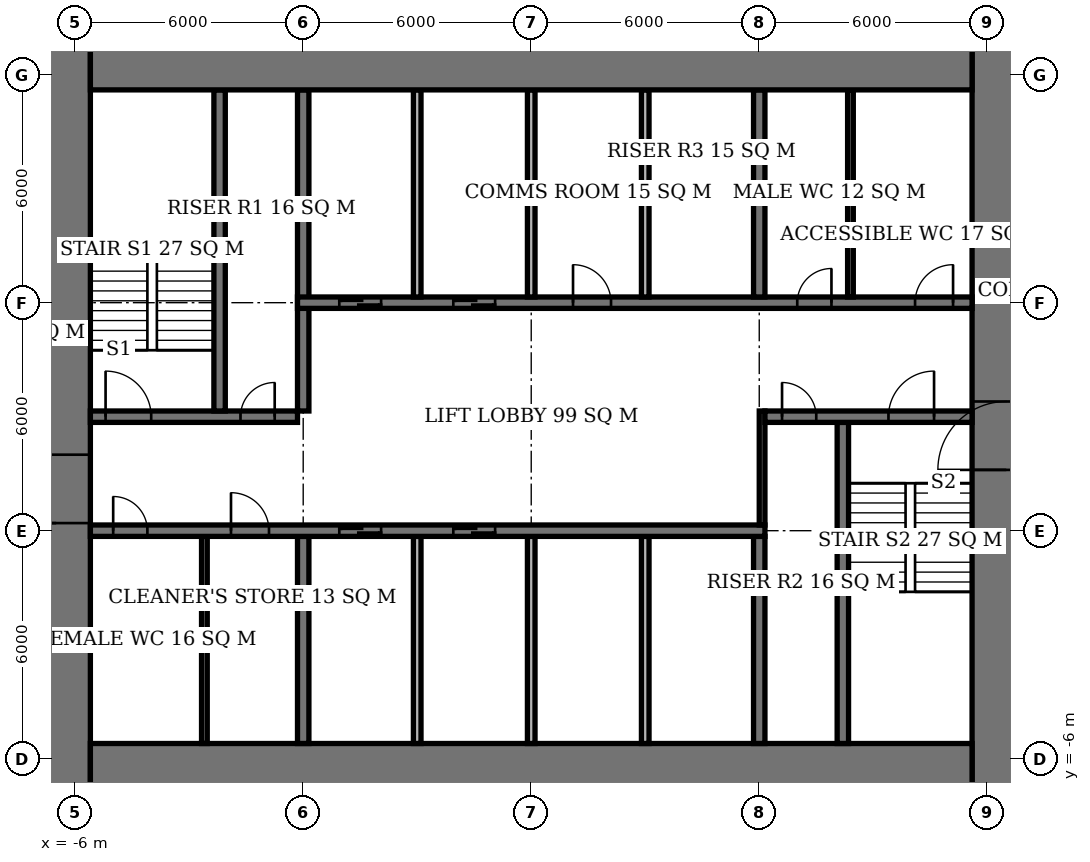
"""IFC4 building model, lengths in metres.
Left out: names, types, materials, properties, quantities, classifications, styles, units other than length and angle.
Written with IfcOpenShell. Run it as: python <this file> out.ifc"""

import sys

from ifc_helpers import new_model, si_unit, direction, frame, frame_2d, origin, place, context, subcontext, project, spatial, rectangle, extrude, element, fill, save


model = new_model("IFC4")
c1 = context("Model", 3, precision=1e-05, world=origin(), true_north=direction((0.0, 1.0)))
c2 = subcontext(c1, "Body", "Model", "MODEL_VIEW")
j1 = project(units=[si_unit("LENGTHUNIT", "METRE"), si_unit("PLANEANGLEUNIT", "RADIAN")], contexts=[c1])
p1 = place(None, origin())
s1 = spatial("IfcSite", under=j1, at=p1, CompositionType="ELEMENT")
p2 = place(p1, origin())
s2 = spatial("IfcBuilding", under=s1, at=p2, CompositionType="ELEMENT")
p3 = place(p2, frame((0.0, 0.0, 117.2)))
s3 = spatial("IfcBuildingStorey", under=s2, at=p3, CompositionType="ELEMENT", Elevation=117.2)
for number, where, z_axis, x_axis in (
    (1, (-5.6, -6.6, 0.0), (0.0, 0.0, 1.0), (1.0, 0.0, 0.0)),
    (2, (-5.6, 12.6, 0.0), (0.0, 0.0, 1.0), (1.0, 0.0, 0.0)),
):
    element("IfcWall", number, at=place(p3, frame(where, z_axis=z_axis, x_axis=x_axis)), inside=s3, PredefinedType="SHEAR", context=c2, shape_type="SweptSolid", body=[
        extrude(rectangle(XDim=23.2, YDim=2.0, at=frame_2d((11.6, 0.0))), origin(), (0.0, 0.0, 1.0), 3.9),
    ])
p4 = place(p3, frame((-6.5, -7.6, 0.0), z_axis=(0.0, 0.0, 1.0), x_axis=(0.0, 1.0, 0.0)))
e3 = element("IfcWall", 3, at=p4, inside=s3, PredefinedType="SHEAR", context=c2, shape_type="SweptSolid", body=[
    extrude(rectangle(XDim=21.2, YDim=1.8, at=frame_2d((10.6, 0.0))), origin(), (0.0, 0.0, 1.0), 3.9),
])
p5 = place(p4, frame((7.8, 0.0, 0.0)))
e4 = element("IfcOpeningElement", 4, at=p5, cuts=e3, PredefinedType="OPENING", context=c2, shape_type="SweptSolid", body=[
    extrude(rectangle(XDim=1.8, YDim=2.4, at=frame_2d((0.9, 1.2))), frame((0.0, 0.91, 0.0), z_axis=(0.0, -1.0, 0.0), x_axis=(1.0, 0.0, 0.0)), (0.0, 0.0, 1.0), 1.82),
])
p6 = place(p3, frame((18.5, -7.6, 0.0), z_axis=(0.0, 0.0, 1.0), x_axis=(0.0, 1.0, 0.0)))
e5 = element("IfcWall", 5, at=p6, inside=s3, PredefinedType="SHEAR", context=c2, shape_type="SweptSolid", body=[
    extrude(rectangle(XDim=21.2, YDim=1.8, at=frame_2d((10.6, 0.0))), origin(), (0.0, 0.0, 1.0), 3.9),
])
p7 = place(p6, frame((9.2, 0.0, 0.0)))
e6 = element("IfcOpeningElement", 6, at=p7, cuts=e5, PredefinedType="OPENING", context=c2, shape_type="SweptSolid", body=[
    extrude(rectangle(XDim=1.8, YDim=2.4, at=frame_2d((0.9, 1.2))), frame((0.0, 0.91, 0.0), z_axis=(0.0, -1.0, 0.0), x_axis=(1.0, 0.0, 0.0)), (0.0, 0.0, 1.0), 1.82),
])
p8 = place(p3, frame((-5.6, 0.0, 0.0), z_axis=(0.0, 0.0, 1.0), x_axis=(1.0, 0.0, 0.0)))
e7 = element("IfcWall", 7, at=p8, inside=s3, PredefinedType="SHEAR", context=c2, shape_type="SweptSolid", body=[
    extrude(rectangle(XDim=17.75, YDim=0.3, at=frame_2d((8.875, 0.0))), origin(), (0.0, 0.0, 1.0), 3.9),
])
p9 = place(p8, frame((0.6, 0.0, 0.0)))
e8 = element("IfcOpeningElement", 8, at=p9, cuts=e7, PredefinedType="OPENING", context=c2, shape_type="SweptSolid", body=[
    extrude(rectangle(XDim=0.9, YDim=2.1, at=frame_2d((0.45, 1.05))), frame((0.0, 0.16, 0.0), z_axis=(0.0, -1.0, 0.0), x_axis=(1.0, 0.0, 0.0)), (0.0, 0.0, 1.0), 0.32),
])
p10 = place(p8, frame((3.7, 0.0, 0.0)))
e9 = element("IfcOpeningElement", 9, at=p10, cuts=e7, PredefinedType="OPENING", context=c2, shape_type="SweptSolid", body=[
    extrude(rectangle(XDim=1.0, YDim=2.1, at=frame_2d((0.5, 1.05))), frame((0.0, 0.16, 0.0), z_axis=(0.0, -1.0, 0.0), x_axis=(1.0, 0.0, 0.0)), (0.0, 0.0, 1.0), 0.32),
])
p11 = place(p8, frame((6.55, 0.0, 0.0)))
e10 = element("IfcOpeningElement", 10, at=p11, cuts=e7, PredefinedType="OPENING", context=c2, shape_type="SweptSolid", body=[
    extrude(rectangle(XDim=1.1, YDim=2.1, at=frame_2d((0.55, 1.05))), frame((0.0, 0.16, 0.0), z_axis=(0.0, -1.0, 0.0), x_axis=(1.0, 0.0, 0.0)), (0.0, 0.0, 1.0), 0.32),
])
p12 = place(p8, frame((9.55, 0.0, 0.0)))
e11 = element("IfcOpeningElement", 11, at=p12, cuts=e7, PredefinedType="OPENING", context=c2, shape_type="SweptSolid", body=[
    extrude(rectangle(XDim=1.1, YDim=2.1, at=frame_2d((0.55, 1.05))), frame((0.0, 0.16, 0.0), z_axis=(0.0, -1.0, 0.0), x_axis=(1.0, 0.0, 0.0)), (0.0, 0.0, 1.0), 0.32),
])
p13 = place(p3, frame((-5.6, 3.0, 0.0), z_axis=(0.0, 0.0, 1.0), x_axis=(1.0, 0.0, 0.0)))
e12 = element("IfcWall", 12, at=p13, inside=s3, PredefinedType="SHEAR", context=c2, shape_type="SweptSolid", body=[
    extrude(rectangle(XDim=5.45, YDim=0.3, at=frame_2d((2.725, 0.0))), origin(), (0.0, 0.0, 1.0), 3.9),
])
p14 = place(p13, frame((0.4, 0.0, 0.0)))
e13 = element("IfcOpeningElement", 13, at=p14, cuts=e12, PredefinedType="OPENING", context=c2, shape_type="SweptSolid", body=[
    extrude(rectangle(XDim=1.2, YDim=2.1, at=frame_2d((0.6, 1.05))), frame((0.0, 0.16, 0.0), z_axis=(0.0, -1.0, 0.0), x_axis=(1.0, 0.0, 0.0)), (0.0, 0.0, 1.0), 0.32),
])
p15 = place(p13, frame((3.95, 0.0, 0.0)))
e14 = element("IfcOpeningElement", 14, at=p15, cuts=e12, PredefinedType="OPENING", context=c2, shape_type="SweptSolid", body=[
    extrude(rectangle(XDim=0.9, YDim=2.1, at=frame_2d((0.45, 1.05))), frame((0.0, 0.16, 0.0), z_axis=(0.0, -1.0, 0.0), x_axis=(1.0, 0.0, 0.0)), (0.0, 0.0, 1.0), 0.32),
])
p16 = place(p3, frame((12.15, 3.0, 0.0), z_axis=(0.0, 0.0, 1.0), x_axis=(1.0, 0.0, 0.0)))
e15 = element("IfcWall", 15, at=p16, inside=s3, PredefinedType="SHEAR", context=c2, shape_type="SweptSolid", body=[
    extrude(rectangle(XDim=5.45, YDim=0.3, at=frame_2d((2.725, 0.0))), origin(), (0.0, 0.0, 1.0), 3.9),
])
p17 = place(p16, frame((3.25, 0.0, 0.0)))
e16 = element("IfcOpeningElement", 16, at=p17, cuts=e15, PredefinedType="OPENING", context=c2, shape_type="SweptSolid", body=[
    extrude(rectangle(XDim=1.2, YDim=2.1, at=frame_2d((0.6, 1.05))), frame((0.0, 0.16, 0.0), z_axis=(0.0, -1.0, 0.0), x_axis=(1.0, 0.0, 0.0)), (0.0, 0.0, 1.0), 0.32),
])
p18 = place(p16, frame((0.45, 0.0, 0.0)))
e17 = element("IfcOpeningElement", 17, at=p18, cuts=e15, PredefinedType="OPENING", context=c2, shape_type="SweptSolid", body=[
    extrude(rectangle(XDim=0.9, YDim=2.1, at=frame_2d((0.45, 1.05))), frame((0.0, 0.16, 0.0), z_axis=(0.0, -1.0, 0.0), x_axis=(1.0, 0.0, 0.0)), (0.0, 0.0, 1.0), 0.32),
])
p19 = place(p3, frame((-0.15, 6.0, 0.0), z_axis=(0.0, 0.0, 1.0), x_axis=(1.0, 0.0, 0.0)))
e18 = element("IfcWall", 18, at=p19, inside=s3, PredefinedType="SHEAR", context=c2, shape_type="SweptSolid", body=[
    extrude(rectangle(XDim=17.75, YDim=0.3, at=frame_2d((8.875, 0.0))), origin(), (0.0, 0.0, 1.0), 3.9),
])
p20 = place(p19, frame((13.15, 0.0, 0.0)))
e19 = element("IfcOpeningElement", 19, at=p20, cuts=e18, PredefinedType="OPENING", context=c2, shape_type="SweptSolid", body=[
    extrude(rectangle(XDim=0.9, YDim=2.1, at=frame_2d((0.45, 1.05))), frame((0.0, 0.16, 0.0), z_axis=(0.0, -1.0, 0.0), x_axis=(1.0, 0.0, 0.0)), (0.0, 0.0, 1.0), 0.32),
])
p21 = place(p19, frame((16.25, 0.0, 0.0)))
e20 = element("IfcOpeningElement", 20, at=p21, cuts=e18, PredefinedType="OPENING", context=c2, shape_type="SweptSolid", body=[
    extrude(rectangle(XDim=1.0, YDim=2.1, at=frame_2d((0.5, 1.05))), frame((0.0, 0.16, 0.0), z_axis=(0.0, -1.0, 0.0), x_axis=(1.0, 0.0, 0.0)), (0.0, 0.0, 1.0), 0.32),
])
p22 = place(p19, frame((7.25, 0.0, 0.0)))
e21 = element("IfcOpeningElement", 21, at=p22, cuts=e18, PredefinedType="OPENING", context=c2, shape_type="SweptSolid", body=[
    extrude(rectangle(XDim=1.0, YDim=2.1, at=frame_2d((0.5, 1.05))), frame((0.0, 0.16, 0.0), z_axis=(0.0, -1.0, 0.0), x_axis=(1.0, 0.0, 0.0)), (0.0, 0.0, 1.0), 0.32),
])
p23 = place(p19, frame((1.1, 0.0, 0.0)))
e22 = element("IfcOpeningElement", 22, at=p23, cuts=e18, PredefinedType="OPENING", context=c2, shape_type="SweptSolid", body=[
    extrude(rectangle(XDim=1.1, YDim=2.1, at=frame_2d((0.55, 1.05))), frame((0.0, 0.16, 0.0), z_axis=(0.0, -1.0, 0.0), x_axis=(1.0, 0.0, 0.0)), (0.0, 0.0, 1.0), 0.32),
])
p24 = place(p19, frame((4.1, 0.0, 0.0)))
e23 = element("IfcOpeningElement", 23, at=p24, cuts=e18, PredefinedType="OPENING", context=c2, shape_type="SweptSolid", body=[
    extrude(rectangle(XDim=1.1, YDim=2.1, at=frame_2d((0.55, 1.05))), frame((0.0, 0.16, 0.0), z_axis=(0.0, -1.0, 0.0), x_axis=(1.0, 0.0, 0.0)), (0.0, 0.0, 1.0), 0.32),
])
p25 = place(p3, frame((0.0, -5.6, 0.0), z_axis=(0.0, 0.0, 1.0), x_axis=(0.0, 1.0, 0.0)))
e24 = element("IfcWall", 24, at=p25, inside=s3, PredefinedType="SHEAR", context=c2, shape_type="SweptSolid", body=[
    extrude(rectangle(XDim=5.45, YDim=0.3, at=frame_2d((2.725, 0.0))), origin(), (0.0, 0.0, 1.0), 3.9),
])
p26 = place(p3, frame((0.0, 3.15, 0.0), z_axis=(0.0, 0.0, 1.0), x_axis=(0.0, 1.0, 0.0)))
e25 = element("IfcWall", 25, at=p26, inside=s3, PredefinedType="SHEAR", context=c2, shape_type="SweptSolid", body=[
    extrude(rectangle(XDim=8.45, YDim=0.3, at=frame_2d((4.225, 0.0))), origin(), (0.0, 0.0, 1.0), 3.9),
])
for number, where, z_axis, x_axis in (
    (26, (12.0, -5.6, 0.0), (0.0, 0.0, 1.0), (0.0, 1.0, 0.0)),
    (27, (12.0, 6.15, 0.0), (0.0, 0.0, 1.0), (0.0, 1.0, 0.0)),
):
    element("IfcWall", number, at=place(p3, frame(where, z_axis=z_axis, x_axis=x_axis)), inside=s3, PredefinedType="SHEAR", context=c2, shape_type="SweptSolid", body=[
        extrude(rectangle(XDim=5.45, YDim=0.3, at=frame_2d((2.725, 0.0))), origin(), (0.0, 0.0, 1.0), 3.9),
    ])
for number, where, z_axis, x_axis in (
    (28, (-2.2, 3.15, 0.0), (0.0, 0.0, 1.0), (0.0, 1.0, 0.0)),
    (29, (14.2, -5.6, 0.0), (0.0, 0.0, 1.0), (0.0, 1.0, 0.0)),
):
    element("IfcWall", number, at=place(p3, frame(where, z_axis=z_axis, x_axis=x_axis)), inside=s3, PredefinedType="SHEAR", context=c2, shape_type="SweptSolid", body=[
        extrude(rectangle(XDim=8.45, YDim=0.3, at=frame_2d((4.225, 0.0))), origin(), (0.0, 0.0, 1.0), 3.9),
    ])
for number, where, z_axis, x_axis in (
    (30, (3.0, 6.15, 0.0), (0.0, 0.0, 1.0), (0.0, 1.0, 0.0)),
    (31, (6.0, 6.15, 0.0), (0.0, 0.0, 1.0), (0.0, 1.0, 0.0)),
    (32, (9.0, 6.15, 0.0), (0.0, 0.0, 1.0), (0.0, 1.0, 0.0)),
    (33, (3.0, -5.6, 0.0), (0.0, 0.0, 1.0), (0.0, 1.0, 0.0)),
    (34, (6.0, -5.6, 0.0), (0.0, 0.0, 1.0), (0.0, 1.0, 0.0)),
    (35, (9.0, -5.6, 0.0), (0.0, 0.0, 1.0), (0.0, 1.0, 0.0)),
):
    element("IfcWall", number, at=place(p3, frame(where, z_axis=z_axis, x_axis=x_axis)), inside=s3, PredefinedType="SOLIDWALL", context=c2, shape_type="SweptSolid", body=[
        extrude(rectangle(XDim=5.45, YDim=0.2, at=frame_2d((2.725, 0.0))), origin(), (0.0, 0.0, 1.0), 3.9),
    ])
for number, where, z_axis, x_axis in (
    (36, (-2.6, -5.6, 0.0), (0.0, 0.0, 1.0), (0.0, 1.0, 0.0)),
    (37, (14.4, 6.15, 0.0), (0.0, 0.0, 1.0), (0.0, 1.0, 0.0)),
):
    element("IfcWall", number, at=place(p3, frame(where, z_axis=z_axis, x_axis=x_axis)), inside=s3, PredefinedType="PLUMBINGWALL", context=c2, shape_type="SweptSolid", body=[
        extrude(rectangle(XDim=5.45, YDim=0.15, at=frame_2d((2.725, 0.0))), origin(), (0.0, 0.0, 1.0), 3.65),
    ])
p27 = place(p3, frame((12.075, 0.15, 0.0), z_axis=(0.0, 0.0, 1.0), x_axis=(0.0, 1.0, 0.0)))
e38 = element("IfcWall", 38, at=p27, inside=s3, PredefinedType="PARTITIONING", context=c2, shape_type="SweptSolid", body=[
    extrude(rectangle(XDim=3.0, YDim=0.15, at=frame_2d((1.5, 0.0))), origin(), (0.0, 0.0, 1.0), 3.65),
])
p28 = place(p5, origin())
e39 = element("IfcDoor", 39, at=p28, inside=s3, OperationType="DOUBLE_DOOR_SINGLE_SWING", PredefinedType="DOOR", context=c2, shape_type="SweptSolid", body=[
    extrude(rectangle(XDim=1.8, YDim=2.4, at=frame_2d((0.9, 1.2))), frame((0.0, 0.025, 0.0), z_axis=(0.0, -1.0, 0.0), x_axis=(1.0, 0.0, 0.0)), (0.0, 0.0, 1.0), 0.05),
])
fill(e4, e39)
p29 = place(p7, origin())
e40 = element("IfcDoor", 40, at=p29, inside=s3, OperationType="DOUBLE_DOOR_SINGLE_SWING", PredefinedType="DOOR", context=c2, shape_type="SweptSolid", body=[
    extrude(rectangle(XDim=1.8, YDim=2.4, at=frame_2d((0.9, 1.2))), frame((0.0, 0.025, 0.0), z_axis=(0.0, -1.0, 0.0), x_axis=(1.0, 0.0, 0.0)), (0.0, 0.0, 1.0), 0.05),
])
fill(e6, e40)
p30 = place(p14, origin())
e41 = element("IfcDoor", 41, at=p30, inside=s3, OperationType="SINGLE_SWING_LEFT", PredefinedType="DOOR", context=c2, shape_type="SweptSolid", body=[
    extrude(rectangle(XDim=1.2, YDim=2.1, at=frame_2d((0.6, 1.05))), frame((0.0, 0.025, 0.0), z_axis=(0.0, -1.0, 0.0), x_axis=(1.0, 0.0, 0.0)), (0.0, 0.0, 1.0), 0.05),
])
fill(e13, e41)
p31 = place(p15, origin())
e42 = element("IfcDoor", 42, at=p31, inside=s3, OperationType="SINGLE_SWING_RIGHT", PredefinedType="DOOR", context=c2, shape_type="SweptSolid", body=[
    extrude(rectangle(XDim=0.9, YDim=2.1, at=frame_2d((0.45, 1.05))), frame((0.0, 0.025, 0.0), z_axis=(0.0, -1.0, 0.0), x_axis=(1.0, 0.0, 0.0)), (0.0, 0.0, 1.0), 0.05),
])
fill(e14, e42)
p32 = place(p17, origin())
e43 = element("IfcDoor", 43, at=p32, inside=s3, OperationType="SINGLE_SWING_RIGHT", PredefinedType="DOOR", context=c2, shape_type="SweptSolid", body=[
    extrude(rectangle(XDim=1.2, YDim=2.1, at=frame_2d((0.6, 1.05))), frame((0.0, 0.025, 0.0), z_axis=(0.0, -1.0, 0.0), x_axis=(1.0, 0.0, 0.0)), (0.0, 0.0, 1.0), 0.05),
])
fill(e16, e43)
p33 = place(p18, origin())
e44 = element("IfcDoor", 44, at=p33, inside=s3, OperationType="SINGLE_SWING_LEFT", PredefinedType="DOOR", context=c2, shape_type="SweptSolid", body=[
    extrude(rectangle(XDim=0.9, YDim=2.1, at=frame_2d((0.45, 1.05))), frame((0.0, 0.025, 0.0), z_axis=(0.0, -1.0, 0.0), x_axis=(1.0, 0.0, 0.0)), (0.0, 0.0, 1.0), 0.05),
])
fill(e17, e44)
p34 = place(p9, origin())
e45 = element("IfcDoor", 45, at=p34, inside=s3, OperationType="SINGLE_SWING_LEFT", PredefinedType="DOOR", context=c2, shape_type="SweptSolid", body=[
    extrude(rectangle(XDim=0.9, YDim=2.1, at=frame_2d((0.45, 1.05))), frame((0.0, 0.025, 0.0), z_axis=(0.0, -1.0, 0.0), x_axis=(1.0, 0.0, 0.0)), (0.0, 0.0, 1.0), 0.05),
])
fill(e8, e45)
p35 = place(p10, origin())
e46 = element("IfcDoor", 46, at=p35, inside=s3, OperationType="SINGLE_SWING_LEFT", PredefinedType="DOOR", context=c2, shape_type="SweptSolid", body=[
    extrude(rectangle(XDim=1.0, YDim=2.1, at=frame_2d((0.5, 1.05))), frame((0.0, 0.025, 0.0), z_axis=(0.0, -1.0, 0.0), x_axis=(1.0, 0.0, 0.0)), (0.0, 0.0, 1.0), 0.05),
])
fill(e9, e46)
p36 = place(p20, origin())
e47 = element("IfcDoor", 47, at=p36, inside=s3, OperationType="SINGLE_SWING_RIGHT", PredefinedType="DOOR", context=c2, shape_type="SweptSolid", body=[
    extrude(rectangle(XDim=0.9, YDim=2.1, at=frame_2d((0.45, 1.05))), frame((0.0, 0.025, 0.0), z_axis=(0.0, -1.0, 0.0), x_axis=(1.0, 0.0, 0.0)), (0.0, 0.0, 1.0), 0.05),
])
fill(e19, e47)
p37 = place(p21, origin())
e48 = element("IfcDoor", 48, at=p37, inside=s3, OperationType="SINGLE_SWING_RIGHT", PredefinedType="DOOR", context=c2, shape_type="SweptSolid", body=[
    extrude(rectangle(XDim=1.0, YDim=2.1, at=frame_2d((0.5, 1.05))), frame((0.0, 0.025, 0.0), z_axis=(0.0, -1.0, 0.0), x_axis=(1.0, 0.0, 0.0)), (0.0, 0.0, 1.0), 0.05),
])
fill(e20, e48)
p38 = place(p22, origin())
e49 = element("IfcDoor", 49, at=p38, inside=s3, OperationType="SINGLE_SWING_LEFT", PredefinedType="DOOR", context=c2, shape_type="SweptSolid", body=[
    extrude(rectangle(XDim=1.0, YDim=2.1, at=frame_2d((0.5, 1.05))), frame((0.0, 0.025, 0.0), z_axis=(0.0, -1.0, 0.0), x_axis=(1.0, 0.0, 0.0)), (0.0, 0.0, 1.0), 0.05),
])
fill(e21, e49)
p39 = place(p23, origin())
e50 = element("IfcDoor", 50, at=p39, inside=s3, OperationType="DOUBLE_DOOR_SLIDING", PredefinedType="USERDEFINED", context=c2, shape_type="SweptSolid", body=[
    extrude(rectangle(XDim=1.1, YDim=2.1, at=frame_2d((0.55, 1.05))), frame((0.0, 0.025, 0.0), z_axis=(0.0, -1.0, 0.0), x_axis=(1.0, 0.0, 0.0)), (0.0, 0.0, 1.0), 0.05),
])
fill(e22, e50)
p40 = place(p24, origin())
e51 = element("IfcDoor", 51, at=p40, inside=s3, OperationType="DOUBLE_DOOR_SLIDING", PredefinedType="USERDEFINED", context=c2, shape_type="SweptSolid", body=[
    extrude(rectangle(XDim=1.1, YDim=2.1, at=frame_2d((0.55, 1.05))), frame((0.0, 0.025, 0.0), z_axis=(0.0, -1.0, 0.0), x_axis=(1.0, 0.0, 0.0)), (0.0, 0.0, 1.0), 0.05),
])
fill(e23, e51)
p41 = place(p11, origin())
e52 = element("IfcDoor", 52, at=p41, inside=s3, OperationType="DOUBLE_DOOR_SLIDING", PredefinedType="USERDEFINED", context=c2, shape_type="SweptSolid", body=[
    extrude(rectangle(XDim=1.1, YDim=2.1, at=frame_2d((0.55, 1.05))), frame((0.0, 0.025, 0.0), z_axis=(0.0, -1.0, 0.0), x_axis=(1.0, 0.0, 0.0)), (0.0, 0.0, 1.0), 0.05),
])
fill(e10, e52)
p42 = place(p12, origin())
e53 = element("IfcDoor", 53, at=p42, inside=s3, OperationType="DOUBLE_DOOR_SLIDING", PredefinedType="USERDEFINED", context=c2, shape_type="SweptSolid", body=[
    extrude(rectangle(XDim=1.1, YDim=2.1, at=frame_2d((0.55, 1.05))), frame((0.0, 0.025, 0.0), z_axis=(0.0, -1.0, 0.0), x_axis=(1.0, 0.0, 0.0)), (0.0, 0.0, 1.0), 0.05),
])
fill(e11, e53)
save(model, sys.argv[1])
